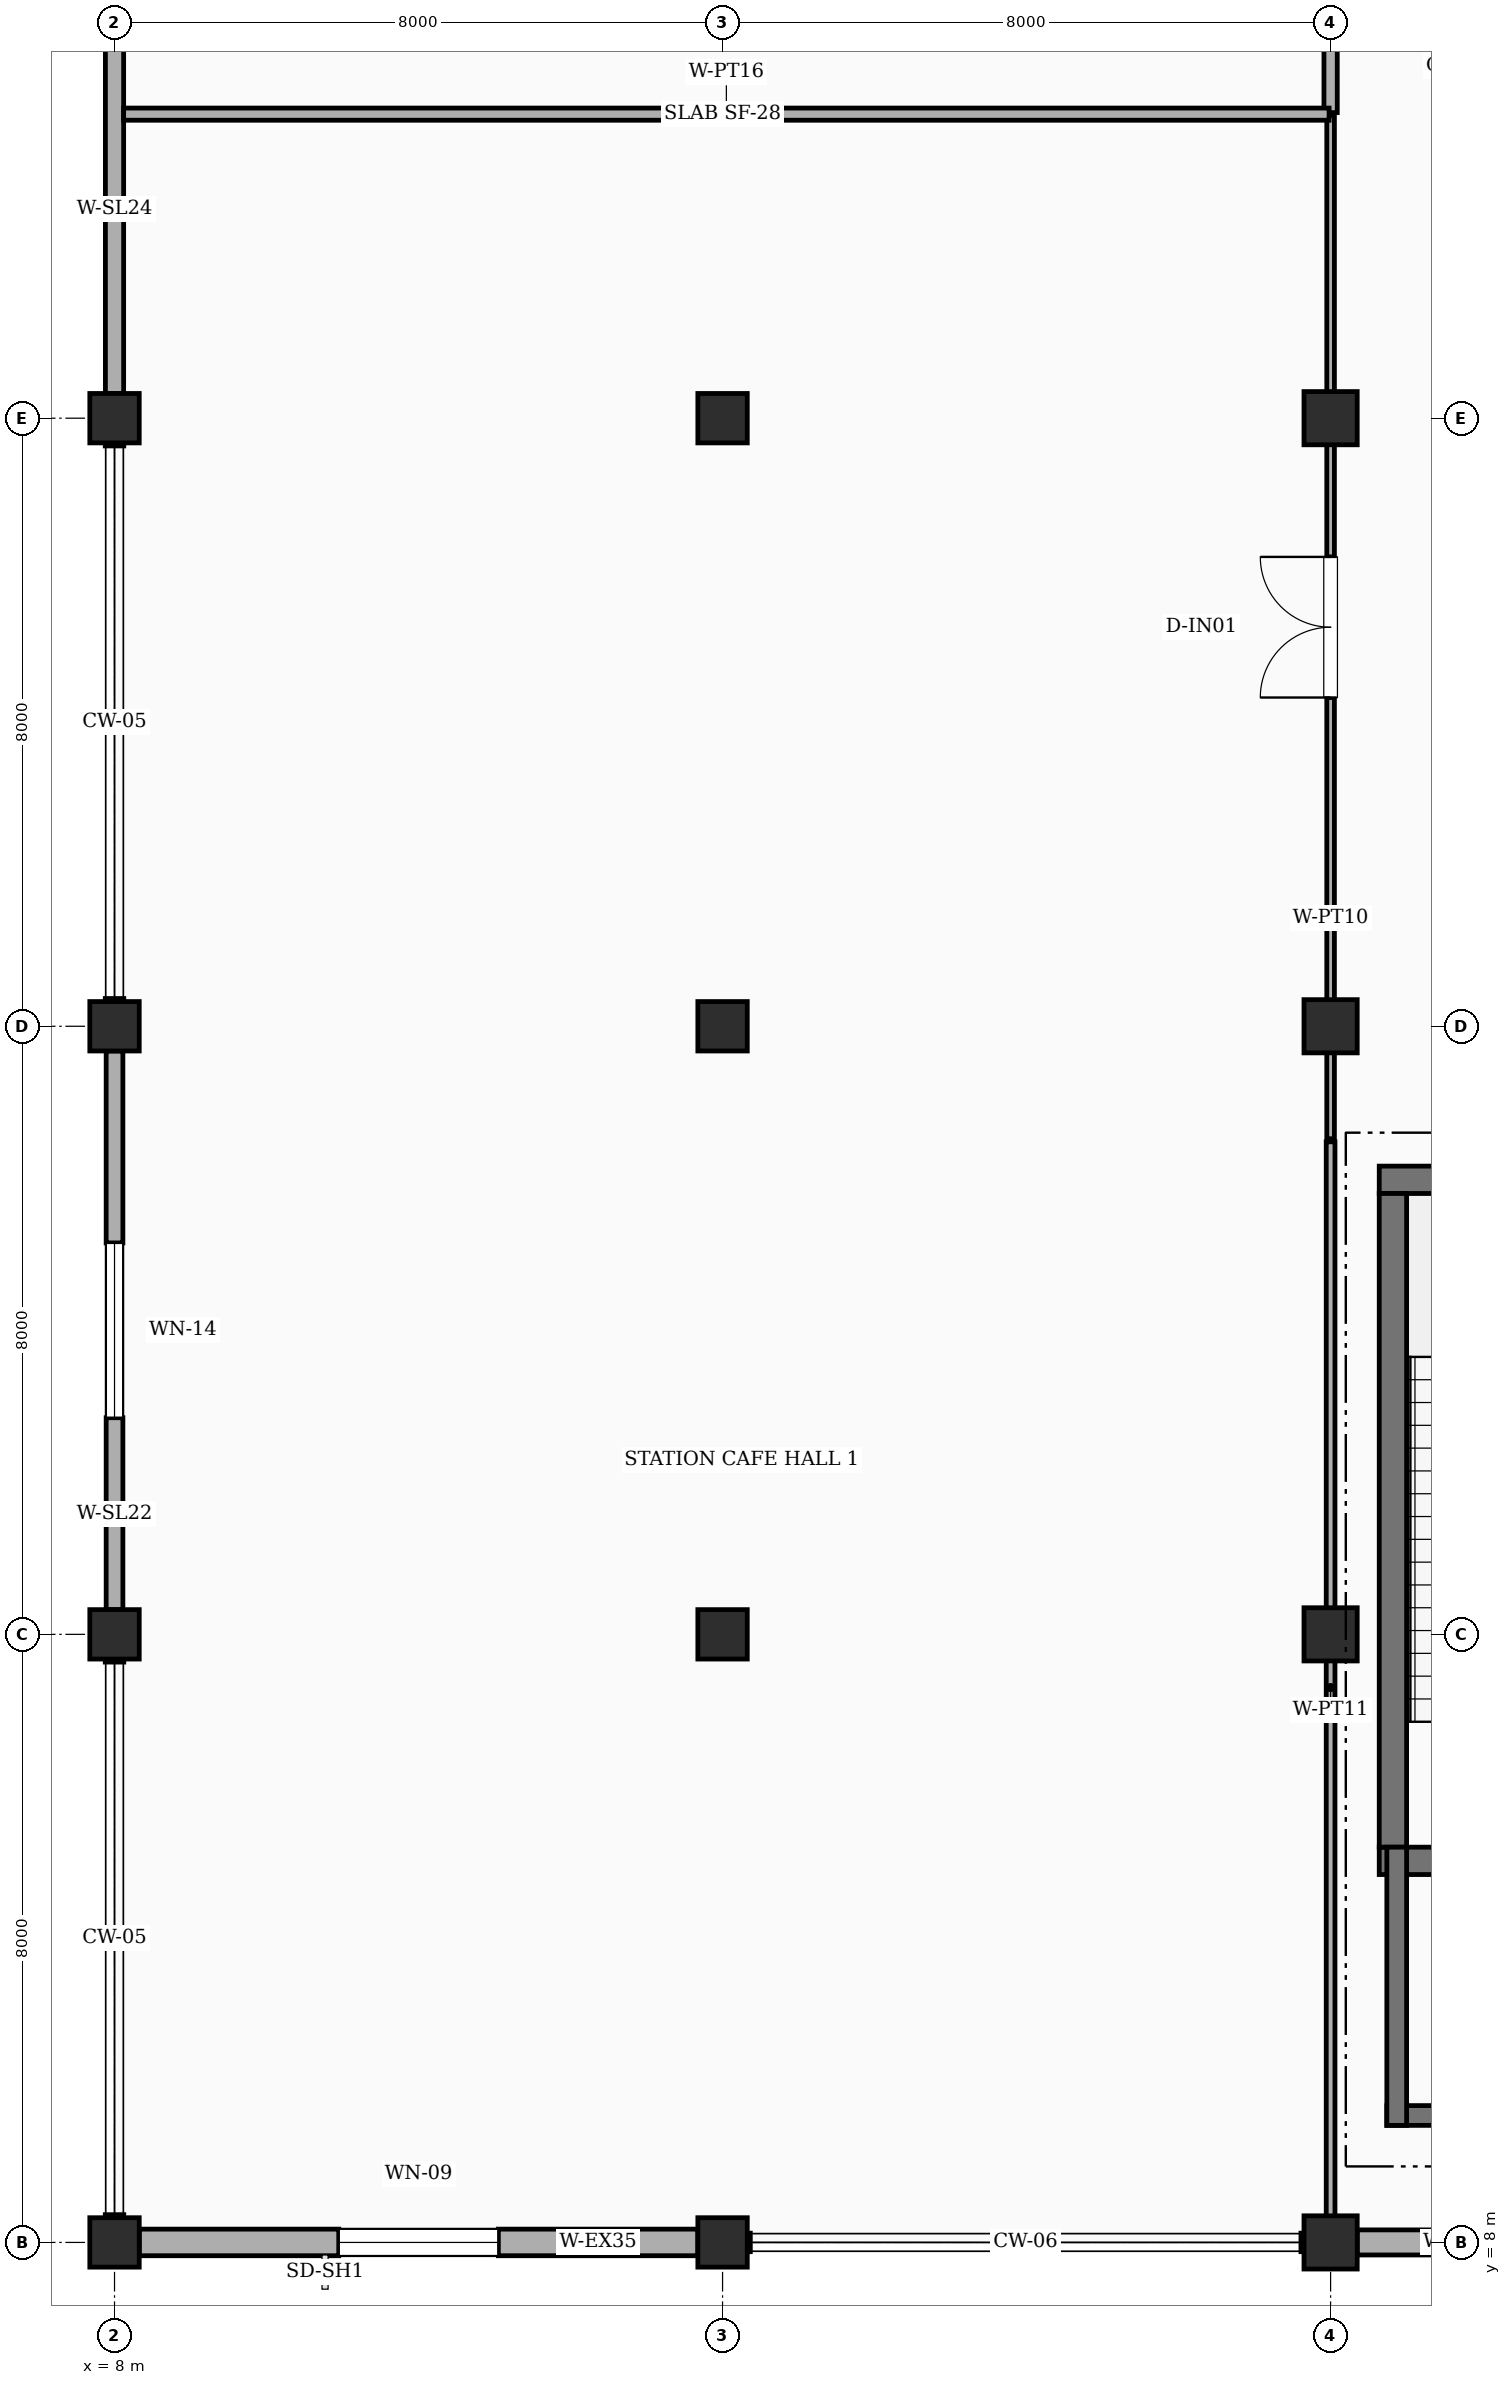
"""IFC4 building model, lengths in metres.
Left out: names, types, materials, properties, quantities, classifications, styles, units other than length and angle.
Written with IfcOpenShell. Run it as: python <this file> out.ifc"""

import sys

from ifc_helpers import new_model, si_unit, direction, frame, frame_2d, origin, origin_2d, place, context, subcontext, project, spatial, rectangle, extrude, element, fill, save


model = new_model("IFC4")
c1 = context("Model", 3, precision=1e-05, world=origin(), true_north=direction((0.0, 1.0)))
c2 = subcontext(c1, "Body", "Model", "MODEL_VIEW")
j1 = project(units=[si_unit("LENGTHUNIT", "METRE"), si_unit("PLANEANGLEUNIT", "RADIAN")], contexts=[c1])
p1 = place(None, origin())
s1 = spatial("IfcSite", under=j1, at=p1, CompositionType="ELEMENT")
p2 = place(p1, origin())
s2 = spatial("IfcBuilding", under=s1, at=p2, CompositionType="ELEMENT")
p3 = place(p2, frame((0.0, 0.0, 5.4)))
s3 = spatial("IfcBuildingStorey", under=s2, at=p3, CompositionType="ELEMENT", Elevation=5.4)
for number, where, z_axis, x_axis in (
    (1, (8.0, 8.0, 0.0), (0.0, 0.0, 1.0), (1.0, 0.0, 0.0)),
    (2, (8.0, 16.0, 0.0), (0.0, 0.0, 1.0), (1.0, 0.0, 0.0)),
    (3, (8.0, 24.0, 0.0), (0.0, 0.0, 1.0), (1.0, 0.0, 0.0)),
    (4, (8.0, 32.0, 0.0), (0.0, 0.0, 1.0), (1.0, 0.0, 0.0)),
    (5, (16.0, 8.0, 0.0), (0.0, 0.0, 1.0), (1.0, 0.0, 0.0)),
    (6, (16.0, 16.0, 0.0), (0.0, 0.0, 1.0), (1.0, 0.0, 0.0)),
    (7, (16.0, 24.0, 0.0), (0.0, 0.0, 1.0), (1.0, 0.0, 0.0)),
    (8, (16.0, 32.0, 0.0), (0.0, 0.0, 1.0), (1.0, 0.0, 0.0)),
):
    element("IfcColumn", number, at=place(p3, frame(where, z_axis=z_axis, x_axis=x_axis)), inside=s3, PredefinedType="COLUMN", context=c2, shape_type="SweptSolid", body=[
        extrude(rectangle(XDim=0.65, YDim=0.65, at=origin_2d()), origin(), (0.0, 0.0, 1.0), 5.4),
    ])
for number, where, z_axis, x_axis in (
    (9, (24.0, 8.0, 0.0), (0.0, 0.0, 1.0), (1.0, 0.0, 0.0)),
    (10, (24.0, 16.0, 0.0), (0.0, 0.0, 1.0), (1.0, 0.0, 0.0)),
    (11, (24.0, 24.0, 0.0), (0.0, 0.0, 1.0), (1.0, 0.0, 0.0)),
    (12, (24.0, 32.0, 0.0), (0.0, 0.0, 1.0), (1.0, 0.0, 0.0)),
):
    element("IfcColumn", number, at=place(p3, frame(where, z_axis=z_axis, x_axis=x_axis)), inside=s3, PredefinedType="COLUMN", context=c2, shape_type="SweptSolid", body=[
        extrude(rectangle(XDim=0.7, YDim=0.7, at=origin_2d()), origin(), (0.0, 0.0, 1.0), 5.4),
    ])
p4 = place(p3, frame((8.325, 8.0, 0.0), z_axis=(0.0, 0.0, 1.0), x_axis=(1.0, 0.0, 0.0)))
e13 = element("IfcWall", 13, at=p4, inside=s3, PredefinedType="STANDARD", context=c2, shape_type="SweptSolid", body=[
    extrude(rectangle(XDim=7.35, YDim=0.35, at=frame_2d((3.675, 0.0))), origin(), (0.0, 0.0, 1.0), 4.485),
])
p5 = place(p4, frame((2.625, 0.0, 0.95)))
e14 = element("IfcOpeningElement", 14, at=p5, cuts=e13, PredefinedType="OPENING", context=c2, shape_type="SweptSolid", body=[
    extrude(rectangle(XDim=2.1, YDim=2.0, at=frame_2d((1.05, 1.0))), frame((0.0, 0.185, 0.0), z_axis=(0.0, -1.0, 0.0), x_axis=(1.0, 0.0, 0.0)), (0.0, 0.0, 1.0), 0.37),
])
p6 = place(p3, frame((24.35, 8.0, 0.0), z_axis=(0.0, 0.0, 1.0), x_axis=(1.0, 0.0, 0.0)))
e15 = element("IfcWall", 15, at=p6, inside=s3, PredefinedType="STANDARD", context=c2, shape_type="SweptSolid", body=[
    extrude(rectangle(XDim=7.3, YDim=0.33, at=frame_2d((3.65, 0.0))), origin(), (0.0, 0.0, 1.0), 4.44),
])
p7 = place(p6, frame((2.75, 0.0, 0.95)))
e16 = element("IfcOpeningElement", 16, at=p7, cuts=e15, PredefinedType="OPENING", context=c2, shape_type="SweptSolid", body=[
    extrude(rectangle(XDim=1.8, YDim=2.0, at=frame_2d((0.9, 1.0))), frame((0.0, 0.175, 0.0), z_axis=(0.0, -1.0, 0.0), x_axis=(1.0, 0.0, 0.0)), (0.0, 0.0, 1.0), 0.35),
])
p8 = place(p3, frame((8.0, 39.675, 0.0), z_axis=(0.0, 0.0, 1.0), x_axis=(0.0, -1.0, 0.0)))
e17 = element("IfcWall", 17, at=p8, inside=s3, PredefinedType="SOLIDWALL", context=c2, shape_type="SweptSolid", body=[
    extrude(rectangle(XDim=7.35, YDim=0.24, at=frame_2d((3.675, 0.0))), origin(), (0.0, 0.0, 1.0), 4.485),
])
p9 = place(p8, frame((0.85, 0.0, 0.95)))
e18 = element("IfcOpeningElement", 18, at=p9, cuts=e17, PredefinedType="OPENING", context=c2, shape_type="SweptSolid", body=[
    extrude(rectangle(XDim=1.65, YDim=1.8, at=frame_2d((0.825, 0.9))), frame((0.0, 0.13, 0.0), z_axis=(0.0, -1.0, 0.0), x_axis=(1.0, 0.0, 0.0)), (0.0, 0.0, 1.0), 0.26),
])
p10 = place(p3, frame((8.0, 23.675, 0.0), z_axis=(0.0, 0.0, 1.0), x_axis=(0.0, -1.0, 0.0)))
e19 = element("IfcWall", 19, at=p10, inside=s3, PredefinedType="SOLIDWALL", context=c2, shape_type="SweptSolid", body=[
    extrude(rectangle(XDim=7.35, YDim=0.22, at=frame_2d((3.675, 0.0))), origin(), (0.0, 0.0, 1.0), 4.485),
])
p11 = place(p10, frame((2.525, 0.0, 0.95)))
e20 = element("IfcOpeningElement", 20, at=p11, cuts=e19, PredefinedType="OPENING", context=c2, shape_type="SweptSolid", body=[
    extrude(rectangle(XDim=2.3, YDim=1.8, at=frame_2d((1.15, 0.9))), frame((0.0, 0.12, 0.0), z_axis=(0.0, -1.0, 0.0), x_axis=(1.0, 0.0, 0.0)), (0.0, 0.0, 1.0), 0.24),
])
p12 = place(p3, frame((24.64, 13.02, 0.0), z_axis=(0.0, 0.0, 1.0), x_axis=(1.0, 0.0, 0.0)))
e21 = element("IfcWall", 21, at=p12, inside=s3, PredefinedType="SHEAR", context=c2, shape_type="SweptSolid", body=[
    extrude(rectangle(XDim=4.22, YDim=0.36, at=frame_2d((2.11, 0.0))), origin(), (0.0, 0.0, 1.0), 5.4),
])
p13 = place(p12, frame((1.585, 0.0, 0.0)))
e22 = element("IfcOpeningElement", 22, at=p13, cuts=e21, PredefinedType="OPENING", context=c2, shape_type="SweptSolid", body=[
    extrude(rectangle(XDim=1.05, YDim=2.15, at=frame_2d((0.525, 1.075))), frame((0.0, 0.19, 0.0), z_axis=(0.0, -1.0, 0.0), x_axis=(1.0, 0.0, 0.0)), (0.0, 0.0, 1.0), 0.38),
])
p14 = place(p3, frame((24.64, 21.98, 0.0), z_axis=(0.0, 0.0, 1.0), x_axis=(1.0, 0.0, 0.0)))
e23 = element("IfcWall", 23, at=p14, inside=s3, PredefinedType="SHEAR", context=c2, shape_type="SweptSolid", body=[
    extrude(rectangle(XDim=4.22, YDim=0.36, at=frame_2d((2.11, 0.0))), origin(), (0.0, 0.0, 1.0), 5.4),
])
p15 = place(p3, frame((24.82, 13.2, 0.0), z_axis=(0.0, 0.0, 1.0), x_axis=(0.0, 1.0, 0.0)))
e24 = element("IfcWall", 24, at=p15, inside=s3, PredefinedType="SHEAR", context=c2, shape_type="SweptSolid", body=[
    extrude(rectangle(XDim=8.6, YDim=0.36, at=frame_2d((4.3, 0.0))), origin(), (0.0, 0.0, 1.0), 5.4),
])
p16 = place(p3, frame((31.51, 9.67, 0.0), z_axis=(0.0, 0.0, 1.0), x_axis=(-1.0, 0.0, 0.0)))
e25 = element("IfcWall", 25, at=p16, inside=s3, PredefinedType="SHEAR", context=c2, shape_type="SweptSolid", body=[
    extrude(rectangle(XDim=6.77, YDim=0.26, at=frame_2d((3.385, 0.0))), origin(), (0.0, 0.0, 1.0), 5.4),
])
p17 = place(p3, frame((24.87, 9.54, 0.0), z_axis=(0.0, 0.0, 1.0), x_axis=(0.0, 1.0, 0.0)))
e26 = element("IfcWall", 26, at=p17, inside=s3, PredefinedType="SHEAR", context=c2, shape_type="SweptSolid", body=[
    extrude(rectangle(XDim=3.66, YDim=0.26, at=frame_2d((1.83, 0.0))), origin(), (0.0, 0.0, 1.0), 5.4),
])
p18 = place(p3, frame((24.0, 8.12, 0.0), z_axis=(0.0, 0.0, 1.0), x_axis=(0.0, 1.0, 0.0)))
e27 = element("IfcWall", 27, at=p18, inside=s3, PredefinedType="PARTITIONING", context=c2, shape_type="SweptSolid", body=[
    extrude(rectangle(XDim=14.36, YDim=0.115, at=frame_2d((7.18, 0.0))), origin(), (0.0, 0.0, 1.0), 4.39),
])
p19 = place(p3, frame((24.0, 22.52, 0.0), z_axis=(0.0, 0.0, 1.0), x_axis=(0.0, 1.0, 0.0)))
e28 = element("IfcWall", 28, at=p19, inside=s3, PredefinedType="PARTITIONING", context=c2, shape_type="SweptSolid", body=[
    extrude(rectangle(XDim=13.46, YDim=0.1, at=frame_2d((6.73, 0.0))), origin(), (0.0, 0.0, 1.0), 4.39),
])
p20 = place(p19, frame((5.805, 0.0, 0.0)))
e29 = element("IfcOpeningElement", 29, at=p20, cuts=e28, PredefinedType="OPENING", context=c2, shape_type="SweptSolid", body=[
    extrude(rectangle(XDim=1.85, YDim=2.3, at=frame_2d((0.925, 1.15))), frame((0.0, 0.06, 0.0), z_axis=(0.0, -1.0, 0.0), x_axis=(1.0, 0.0, 0.0)), (0.0, 0.0, 1.0), 0.12),
])
p21 = place(p3, frame((24.0, 36.02, 0.0), z_axis=(0.0, 0.0, 1.0), x_axis=(0.0, 1.0, 0.0)))
e30 = element("IfcWall", 30, at=p21, inside=s3, PredefinedType="PARTITIONING", context=c2, shape_type="SweptSolid", body=[
    extrude(rectangle(XDim=27.86, YDim=0.175, at=frame_2d((13.93, 0.0))), origin(), (0.0, 0.0, 1.0), 4.39),
])
p22 = place(p21, frame((16.126, 0.0, 0.0)))
e31 = element("IfcOpeningElement", 31, at=p22, cuts=e30, PredefinedType="OPENING", context=c2, shape_type="SweptSolid", body=[
    extrude(rectangle(XDim=1.85, YDim=2.3, at=frame_2d((0.925, 1.15))), frame((0.0, 0.097, 0.0), z_axis=(0.0, -1.0, 0.0), x_axis=(1.0, 0.0, 0.0)), (0.0, 0.0, 1.0), 0.195),
])
p23 = place(p3, frame((8.12, 36.0, 0.0), z_axis=(0.0, 0.0, 1.0), x_axis=(1.0, 0.0, 0.0)))
e32 = element("IfcWall", 32, at=p23, inside=s3, PredefinedType="PARTITIONING", context=c2, shape_type="SweptSolid", body=[
    extrude(rectangle(XDim=15.86, YDim=0.16, at=frame_2d((7.93, 0.0))), origin(), (0.0, 0.0, 1.0), 4.39),
])
p24 = place(p5, origin())
e33 = element("IfcWindow", 33, at=p24, inside=s3, PartitioningType="SINGLE_PANEL", PredefinedType="WINDOW", context=c2, shape_type="SweptSolid", body=[
    extrude(rectangle(XDim=2.1, YDim=2.0, at=frame_2d((1.05, 1.0))), frame((0.0, 0.03, 0.0), z_axis=(0.0, -1.0, 0.0), x_axis=(1.0, 0.0, 0.0)), (0.0, 0.0, 1.0), 0.06),
])
fill(e14, e33)
p25 = place(p11, origin())
e34 = element("IfcWindow", 34, at=p25, inside=s3, PartitioningType="SINGLE_PANEL", PredefinedType="WINDOW", context=c2, shape_type="SweptSolid", body=[
    extrude(rectangle(XDim=2.3, YDim=1.8, at=frame_2d((1.15, 0.9))), frame((0.0, 0.03, 0.0), z_axis=(0.0, -1.0, 0.0), x_axis=(1.0, 0.0, 0.0)), (0.0, 0.0, 1.0), 0.06),
])
fill(e20, e34)
p26 = place(p20, origin())
e35 = element("IfcDoor", 35, at=p26, inside=s3, OperationType="DOUBLE_DOOR_SINGLE_SWING", PredefinedType="DOOR", context=c2, shape_type="SweptSolid", body=[
    extrude(rectangle(XDim=1.85, YDim=2.3, at=frame_2d((0.925, 1.15))), frame((0.0, 0.025, 0.0), z_axis=(0.0, -1.0, 0.0), x_axis=(1.0, 0.0, 0.0)), (0.0, 0.0, 1.0), 0.05),
])
fill(e29, e35)
save(model, sys.argv[1])
